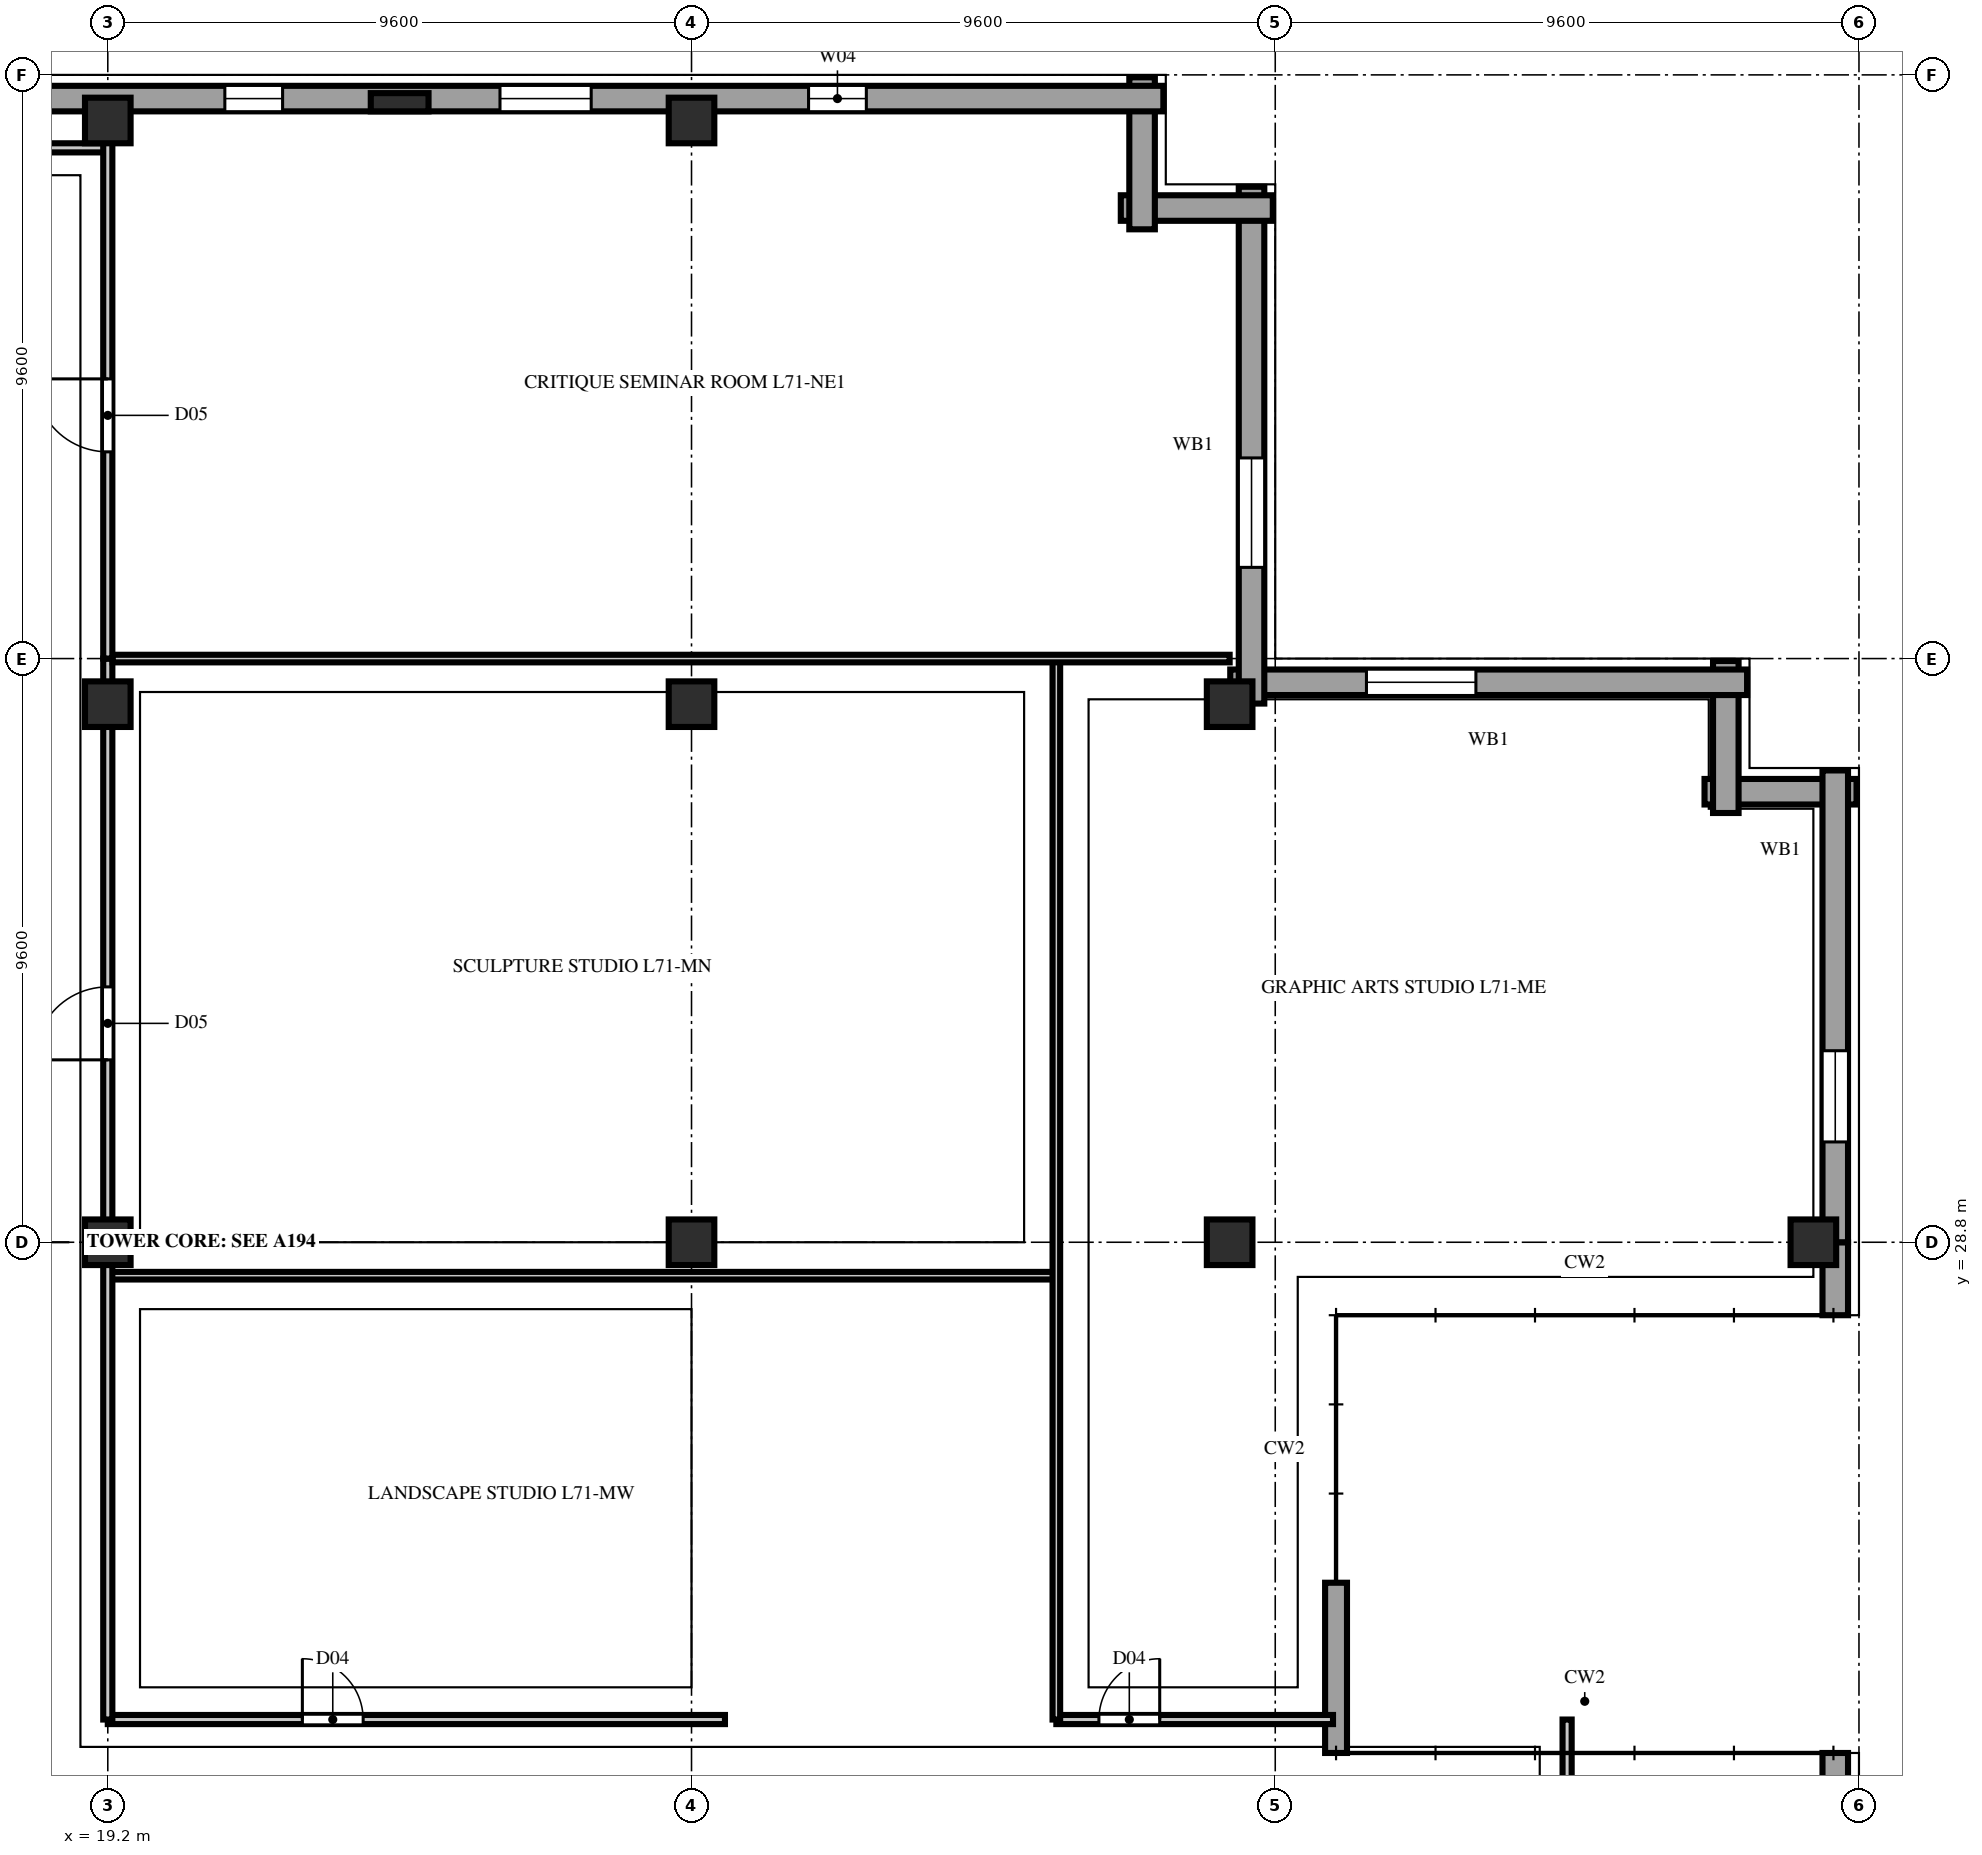
"""IFC4 building model, lengths in metres.
Left out: names, types, materials, properties, quantities, classifications, styles, units other than length and angle.
Written with IfcOpenShell. Run it as: python <this file> out.ifc"""

import sys

from ifc_helpers import new_model, si_unit, direction, frame, frame_2d, origin, origin_2d, place, context, subcontext, project, spatial, rectangle, extrude, element, fill, save


model = new_model("IFC4")
c1 = context("Model", 3, precision=1e-05, world=origin(), true_north=direction((0.0, 1.0)))
c2 = subcontext(c1, "Body", "Model", "MODEL_VIEW")
j1 = project(units=[si_unit("LENGTHUNIT", "METRE"), si_unit("PLANEANGLEUNIT", "RADIAN")], contexts=[c1])
p1 = place(None, origin())
s1 = spatial("IfcSite", under=j1, at=p1, CompositionType="ELEMENT")
p2 = place(p1, origin())
s2 = spatial("IfcBuilding", under=s1, at=p2, CompositionType="ELEMENT")
p3 = place(p2, frame((0.0, 0.0, 281.0)))
s3 = spatial("IfcBuildingStorey", under=s2, at=p3, CompositionType="ELEMENT", Elevation=281.0)
for number, where, z_axis, x_axis in (
    (1, (19.2, 28.8, 0.0), (0.0, 0.0, 1.0), (1.0, 0.0, 0.0)),
    (2, (19.2, 37.65, 0.0), (0.0, 0.0, 1.0), (1.0, 0.0, 0.0)),
    (3, (19.2, 47.25, 0.0), (0.0, 0.0, 1.0), (1.0, 0.0, 0.0)),
    (4, (28.8, 28.8, 0.0), (0.0, 0.0, 1.0), (1.0, 0.0, 0.0)),
    (5, (28.8, 37.65, 0.0), (0.0, 0.0, 1.0), (1.0, 0.0, 0.0)),
    (6, (28.8, 47.25, 0.0), (0.0, 0.0, 1.0), (1.0, 0.0, 0.0)),
    (7, (37.65, 28.8, 0.0), (0.0, 0.0, 1.0), (1.0, 0.0, 0.0)),
    (8, (37.65, 37.65, 0.0), (0.0, 0.0, 1.0), (1.0, 0.0, 0.0)),
    (9, (47.25, 28.8, 0.0), (0.0, 0.0, 1.0), (1.0, 0.0, 0.0)),
):
    element("IfcColumn", number, at=place(p3, frame(where, z_axis=z_axis, x_axis=x_axis)), inside=s3, PredefinedType="COLUMN", context=c2, shape_type="SweptSolid", body=[
        extrude(rectangle(XDim=0.75, YDim=0.75, at=origin_2d()), origin(), (0.0, 0.0, 1.0), 3.8),
    ])
p4 = place(p3, frame((24.0, 47.55, 0.0), z_axis=(0.0, 0.0, 1.0), x_axis=(1.0, 0.0, 0.0)))
e10 = element("IfcColumn", 10, at=p4, inside=s3, PredefinedType="PILASTER", context=c2, shape_type="SweptSolid", body=[
    extrude(rectangle(XDim=0.95, YDim=0.3, at=origin_2d()), origin(), (0.0, 0.0, 1.0), 3.8),
])
p5 = place(p3, frame((47.61, 27.6, 0.0), z_axis=(0.0, 0.0, 1.0), x_axis=(0.0, 1.0, 0.0)))
e11 = element("IfcWall", 11, at=p5, inside=s3, PredefinedType="SOLIDWALL", context=c2, shape_type="SweptSolid", body=[
    extrude(rectangle(XDim=1.2, YDim=0.42, at=frame_2d((0.6, 0.0))), origin(), (0.0, 0.0, 1.0), 2.14),
])
for number, where, z_axis, x_axis in (
    (12, (47.96, 36.21, 0.0), (0.0, 0.0, 1.0), (-1.0, 0.0, 0.0)),
    (13, (45.81, 35.86, 0.0), (0.0, 0.0, 1.0), (0.0, 1.0, 0.0)),
):
    element("IfcWall", number, at=place(p3, frame(where, z_axis=z_axis, x_axis=x_axis)), inside=s3, PredefinedType="SOLIDWALL", context=c2, shape_type="SweptSolid", body=[
        extrude(rectangle(XDim=2.5, YDim=0.42, at=frame_2d((1.25, 0.0))), origin(), (0.0, 0.0, 1.0), 3.54),
    ])
p6 = place(p3, frame((46.16, 38.01, 0.0), z_axis=(0.0, 0.0, 1.0), x_axis=(-1.0, 0.0, 0.0)))
e14 = element("IfcWall", 14, at=p6, inside=s3, PredefinedType="SOLIDWALL", context=c2, shape_type="SweptSolid", body=[
    extrude(rectangle(XDim=8.5, YDim=0.42, at=frame_2d((4.25, 0.0))), origin(), (0.0, 0.0, 1.0), 3.54),
])
p7 = place(p6, frame((4.46, 0.0, 0.85)))
e15 = element("IfcOpeningElement", 15, at=p7, cuts=e14, PredefinedType="OPENING", context=c2, shape_type="SweptSolid", body=[
    extrude(rectangle(XDim=1.8, YDim=1.85, at=frame_2d((0.9, 0.925))), frame((0.0, 0.222, 0.0), z_axis=(0.0, -1.0, 0.0), x_axis=(1.0, 0.0, 0.0)), (0.0, 0.0, 1.0), 0.444),
])
p8 = place(p3, frame((38.01, 37.66, 0.0), z_axis=(0.0, 0.0, 1.0), x_axis=(0.0, 1.0, 0.0)))
e16 = element("IfcWall", 16, at=p8, inside=s3, PredefinedType="SOLIDWALL", context=c2, shape_type="SweptSolid", body=[
    extrude(rectangle(XDim=8.5, YDim=0.42, at=frame_2d((4.25, 0.0))), origin(), (0.0, 0.0, 1.0), 3.54),
])
p9 = place(p8, frame((2.24, 0.0, 0.85)))
e17 = element("IfcOpeningElement", 17, at=p9, cuts=e16, PredefinedType="OPENING", context=c2, shape_type="SweptSolid", body=[
    extrude(rectangle(XDim=1.8, YDim=1.85, at=frame_2d((0.9, 0.925))), frame((0.0, 0.222, 0.0), z_axis=(0.0, -1.0, 0.0), x_axis=(1.0, 0.0, 0.0)), (0.0, 0.0, 1.0), 0.444),
])
for number, where, z_axis, x_axis in (
    (18, (38.36, 45.81, 0.0), (0.0, 0.0, 1.0), (-1.0, 0.0, 0.0)),
    (19, (36.21, 45.46, 0.0), (0.0, 0.0, 1.0), (0.0, 1.0, 0.0)),
):
    element("IfcWall", number, at=place(p3, frame(where, z_axis=z_axis, x_axis=x_axis)), inside=s3, PredefinedType="SOLIDWALL", context=c2, shape_type="SweptSolid", body=[
        extrude(rectangle(XDim=2.5, YDim=0.42, at=frame_2d((1.25, 0.0))), origin(), (0.0, 0.0, 1.0), 3.54),
    ])
p10 = place(p3, frame((36.56, 47.61, 0.0), z_axis=(0.0, 0.0, 1.0), x_axis=(-1.0, 0.0, 0.0)))
e20 = element("IfcWall", 20, at=p10, inside=s3, PredefinedType="SOLIDWALL", context=c2, shape_type="SweptSolid", body=[
    extrude(rectangle(XDim=34.085, YDim=0.42, at=frame_2d((17.042, 0.0))), origin(), (0.0, 0.0, 1.0), 3.54),
])
p11 = place(p10, frame((4.885, 0.0, 0.9)))
e21 = element("IfcOpeningElement", 21, at=p11, cuts=e20, PredefinedType="OPENING", context=c2, shape_type="SweptSolid", body=[
    extrude(rectangle(XDim=0.95, YDim=1.85, at=frame_2d((0.475, 0.925))), frame((0.0, 0.222, 0.0), z_axis=(0.0, -1.0, 0.0), x_axis=(1.0, 0.0, 0.0)), (0.0, 0.0, 1.0), 0.444),
])
p12 = place(p10, frame((9.41, 0.0, 0.9)))
e22 = element("IfcOpeningElement", 22, at=p12, cuts=e20, PredefinedType="OPENING", context=c2, shape_type="SweptSolid", body=[
    extrude(rectangle(XDim=1.5, YDim=1.85, at=frame_2d((0.75, 0.925))), frame((0.0, 0.222, 0.0), z_axis=(0.0, -1.0, 0.0), x_axis=(1.0, 0.0, 0.0)), (0.0, 0.0, 1.0), 0.444),
])
p13 = place(p10, frame((14.485, 0.0, 0.9)))
e23 = element("IfcOpeningElement", 23, at=p13, cuts=e20, PredefinedType="OPENING", context=c2, shape_type="SweptSolid", body=[
    extrude(rectangle(XDim=0.95, YDim=1.85, at=frame_2d((0.475, 0.925))), frame((0.0, 0.222, 0.0), z_axis=(0.0, -1.0, 0.0), x_axis=(1.0, 0.0, 0.0)), (0.0, 0.0, 1.0), 0.444),
])
p14 = place(p3, frame((39.4, 20.4, 0.0), z_axis=(0.0, 0.0, 1.0), x_axis=(0.0, 1.0, 0.0)))
e24 = element("IfcWall", 24, at=p14, inside=s3, PredefinedType="SOLIDWALL", context=c2, shape_type="SweptSolid", body=[
    extrude(rectangle(XDim=2.8, YDim=0.36, at=frame_2d((1.4, 0.0))), origin(), (0.0, 0.0, 1.0), 3.54),
])
p15 = place(p3, frame((17.05, 46.8, 0.0), z_axis=(0.0, 0.0, 1.0), x_axis=(1.0, 0.0, 0.0)))
e25 = element("IfcWall", 25, at=p15, inside=s3, PredefinedType="PARTITIONING", context=c2, shape_type="SweptSolid", body=[
    extrude(rectangle(XDim=2.15, YDim=0.15, at=frame_2d((1.075, 0.0))), origin(), (0.0, 0.0, 1.0), 3.54),
])
p16 = place(p3, frame((43.2, 18.1, 0.0), z_axis=(0.0, 0.0, 1.0), x_axis=(0.0, 1.0, 0.0)))
e26 = element("IfcWall", 26, at=p16, inside=s3, PredefinedType="PARTITIONING", context=c2, shape_type="SweptSolid", body=[
    extrude(rectangle(XDim=2.85, YDim=0.15, at=frame_2d((1.425, 0.0))), origin(), (0.0, 0.0, 1.0), 3.54),
])
p17 = place(p3, frame((19.2, 20.95, 0.0), z_axis=(0.0, 0.0, 1.0), x_axis=(1.0, 0.0, 0.0)))
e27 = element("IfcWall", 27, at=p17, inside=s3, PredefinedType="PARTITIONING", context=c2, shape_type="SweptSolid", body=[
    extrude(rectangle(XDim=10.15, YDim=0.15, at=frame_2d((5.075, 0.0))), origin(), (0.0, 0.0, 1.0), 3.54),
])
p18 = place(p17, frame((3.2, 0.0, 0.0)))
e28 = element("IfcOpeningElement", 28, at=p18, cuts=e27, PredefinedType="OPENING", context=c2, shape_type="SweptSolid", body=[
    extrude(rectangle(XDim=1.0, YDim=2.2, at=frame_2d((0.5, 1.1))), frame((0.0, 0.087, 0.0), z_axis=(0.0, -1.0, 0.0), x_axis=(1.0, 0.0, 0.0)), (0.0, 0.0, 1.0), 0.174),
])
p19 = place(p3, frame((34.8, 20.95, 0.0), z_axis=(0.0, 0.0, 1.0), x_axis=(1.0, 0.0, 0.0)))
e29 = element("IfcWall", 29, at=p19, inside=s3, PredefinedType="PARTITIONING", context=c2, shape_type="SweptSolid", body=[
    extrude(rectangle(XDim=4.55, YDim=0.15, at=frame_2d((2.275, 0.0))), origin(), (0.0, 0.0, 1.0), 3.54),
])
p20 = place(p19, frame((0.7, 0.0, 0.0)))
e30 = element("IfcOpeningElement", 30, at=p20, cuts=e29, PredefinedType="OPENING", context=c2, shape_type="SweptSolid", body=[
    extrude(rectangle(XDim=1.0, YDim=2.2, at=frame_2d((0.5, 1.1))), frame((0.0, 0.087, 0.0), z_axis=(0.0, -1.0, 0.0), x_axis=(1.0, 0.0, 0.0)), (0.0, 0.0, 1.0), 0.174),
])
p21 = place(p3, frame((19.2, 28.25, 0.0), z_axis=(0.0, 0.0, 1.0), x_axis=(1.0, 0.0, 0.0)))
e31 = element("IfcWall", 31, at=p21, inside=s3, PredefinedType="PARTITIONING", context=c2, shape_type="SweptSolid", body=[
    extrude(rectangle(XDim=15.6, YDim=0.125, at=frame_2d((7.8, 0.0))), origin(), (0.0, 0.0, 1.0), 3.54),
])
p22 = place(p3, frame((34.8, 20.95, 0.0), z_axis=(0.0, 0.0, 1.0), x_axis=(0.0, 1.0, 0.0)))
e32 = element("IfcWall", 32, at=p22, inside=s3, PredefinedType="PARTITIONING", context=c2, shape_type="SweptSolid", body=[
    extrude(rectangle(XDim=17.45, YDim=0.125, at=frame_2d((8.725, 0.0))), origin(), (0.0, 0.0, 1.0), 3.54),
])
p23 = place(p3, frame((19.2, 20.95, 0.0), z_axis=(0.0, 0.0, 1.0), x_axis=(0.0, 1.0, 0.0)))
e33 = element("IfcWall", 33, at=p23, inside=s3, PredefinedType="PARTITIONING", context=c2, shape_type="SweptSolid", body=[
    extrude(rectangle(XDim=17.45, YDim=0.15, at=frame_2d((8.725, 0.0))), origin(), (0.0, 0.0, 1.0), 2.923),
])
p24 = place(p23, frame((10.85, 0.0, 0.0)))
e34 = element("IfcOpeningElement", 34, at=p24, cuts=e33, PredefinedType="OPENING", context=c2, shape_type="SweptSolid", body=[
    extrude(rectangle(XDim=1.2, YDim=2.2, at=frame_2d((0.6, 1.1))), frame((0.0, 0.087, 0.0), z_axis=(0.0, -1.0, 0.0), x_axis=(1.0, 0.0, 0.0)), (0.0, 0.0, 1.0), 0.174),
])
p25 = place(p3, frame((19.28, 38.4, 0.0), z_axis=(0.0, 0.0, 1.0), x_axis=(1.0, 0.0, 0.0)))
e35 = element("IfcWall", 35, at=p25, inside=s3, PredefinedType="PARTITIONING", context=c2, shape_type="SweptSolid", body=[
    extrude(rectangle(XDim=18.37, YDim=0.125, at=frame_2d((9.185, 0.0))), origin(), (0.0, 0.0, 1.0), 3.54),
])
p26 = place(p3, frame((19.2, 38.4, 0.0), z_axis=(0.0, 0.0, 1.0), x_axis=(0.0, 1.0, 0.0)))
e36 = element("IfcWall", 36, at=p26, inside=s3, PredefinedType="PARTITIONING", context=c2, shape_type="SweptSolid", body=[
    extrude(rectangle(XDim=9.05, YDim=0.15, at=frame_2d((4.525, 0.0))), origin(), (0.0, 0.0, 1.0), 2.923),
])
p27 = place(p26, frame((3.4, 0.0, 0.0)))
e37 = element("IfcOpeningElement", 37, at=p27, cuts=e36, PredefinedType="OPENING", context=c2, shape_type="SweptSolid", body=[
    extrude(rectangle(XDim=1.2, YDim=2.2, at=frame_2d((0.6, 1.1))), frame((0.0, 0.087, 0.0), z_axis=(0.0, -1.0, 0.0), x_axis=(1.0, 0.0, 0.0)), (0.0, 0.0, 1.0), 0.174),
])
p28 = place(p3, frame((47.61, 19.2, 0.0), z_axis=(0.0, 0.0, 1.0), x_axis=(0.0, 1.0, 0.0)))
e38 = element("IfcWall", 38, at=p28, inside=s3, PredefinedType="SOLIDWALL", context=c2, shape_type="SweptSolid", body=[
    extrude(rectangle(XDim=1.2, YDim=0.42, at=frame_2d((0.6, 0.0))), origin(), (0.0, 0.0, 1.0), 2.14),
])
p29 = place(p3, frame((47.61, 28.8, 0.0), z_axis=(0.0, 0.0, 1.0), x_axis=(0.0, 1.0, 0.0)))
e39 = element("IfcWall", 39, at=p29, inside=s3, PredefinedType="SOLIDWALL", context=c2, shape_type="SweptSolid", body=[
    extrude(rectangle(XDim=7.76, YDim=0.42, at=frame_2d((3.88, 0.0))), origin(), (0.0, 0.0, 1.0), 3.54),
])
p30 = place(p29, frame((1.65, 0.0, 0.85)))
e40 = element("IfcOpeningElement", 40, at=p30, cuts=e39, PredefinedType="OPENING", context=c2, shape_type="SweptSolid", body=[
    extrude(rectangle(XDim=1.5, YDim=1.85, at=frame_2d((0.75, 0.925))), frame((0.0, 0.222, 0.0), z_axis=(0.0, -1.0, 0.0), x_axis=(1.0, 0.0, 0.0)), (0.0, 0.0, 1.0), 0.444),
])
p31 = place(p30, origin())
e41 = element("IfcWindow", 41, at=p31, inside=s3, PartitioningType="DOUBLE_PANEL_VERTICAL", PredefinedType="WINDOW", context=c2, shape_type="SweptSolid", body=[
    extrude(rectangle(XDim=1.5, YDim=1.85, at=frame_2d((0.75, 0.925))), frame((0.0, 0.11, 0.0), z_axis=(0.0, -1.0, 0.0), x_axis=(1.0, 0.0, 0.0)), (0.0, 0.0, 1.0), 0.06),
])
fill(e40, e41)
p32 = place(p7, origin())
e42 = element("IfcWindow", 42, at=p32, inside=s3, PartitioningType="DOUBLE_PANEL_VERTICAL", PredefinedType="WINDOW", context=c2, shape_type="SweptSolid", body=[
    extrude(rectangle(XDim=1.8, YDim=1.85, at=frame_2d((0.9, 0.925))), frame((0.0, 0.11, 0.0), z_axis=(0.0, -1.0, 0.0), x_axis=(1.0, 0.0, 0.0)), (0.0, 0.0, 1.0), 0.06),
])
fill(e15, e42)
p33 = place(p9, origin())
e43 = element("IfcWindow", 43, at=p33, inside=s3, PartitioningType="DOUBLE_PANEL_VERTICAL", PredefinedType="WINDOW", context=c2, shape_type="SweptSolid", body=[
    extrude(rectangle(XDim=1.8, YDim=1.85, at=frame_2d((0.9, 0.925))), frame((0.0, 0.11, 0.0), z_axis=(0.0, -1.0, 0.0), x_axis=(1.0, 0.0, 0.0)), (0.0, 0.0, 1.0), 0.06),
])
fill(e17, e43)
p34 = place(p11, origin())
e44 = element("IfcWindow", 44, at=p34, inside=s3, PartitioningType="SINGLE_PANEL", PredefinedType="WINDOW", context=c2, shape_type="SweptSolid", body=[
    extrude(rectangle(XDim=0.95, YDim=1.85, at=frame_2d((0.475, 0.925))), frame((0.0, 0.11, 0.0), z_axis=(0.0, -1.0, 0.0), x_axis=(1.0, 0.0, 0.0)), (0.0, 0.0, 1.0), 0.06),
])
fill(e21, e44)
p35 = place(p12, origin())
e45 = element("IfcWindow", 45, at=p35, inside=s3, PartitioningType="DOUBLE_PANEL_VERTICAL", PredefinedType="WINDOW", context=c2, shape_type="SweptSolid", body=[
    extrude(rectangle(XDim=1.5, YDim=1.85, at=frame_2d((0.75, 0.925))), frame((0.0, 0.11, 0.0), z_axis=(0.0, -1.0, 0.0), x_axis=(1.0, 0.0, 0.0)), (0.0, 0.0, 1.0), 0.06),
])
fill(e22, e45)
p36 = place(p13, origin())
e46 = element("IfcWindow", 46, at=p36, inside=s3, PartitioningType="SINGLE_PANEL", PredefinedType="WINDOW", context=c2, shape_type="SweptSolid", body=[
    extrude(rectangle(XDim=0.95, YDim=1.85, at=frame_2d((0.475, 0.925))), frame((0.0, 0.11, 0.0), z_axis=(0.0, -1.0, 0.0), x_axis=(1.0, 0.0, 0.0)), (0.0, 0.0, 1.0), 0.06),
])
fill(e23, e46)
p37 = place(p18, origin())
e47 = element("IfcDoor", 47, at=p37, inside=s3, OperationType="SINGLE_SWING_LEFT", PredefinedType="DOOR", context=c2, shape_type="SweptSolid", body=[
    extrude(rectangle(XDim=1.0, YDim=2.2, at=frame_2d((0.5, 1.1))), frame((0.0, 0.025, 0.0), z_axis=(0.0, -1.0, 0.0), x_axis=(1.0, 0.0, 0.0)), (0.0, 0.0, 1.0), 0.05),
])
fill(e28, e47)
p38 = place(p20, origin())
e48 = element("IfcDoor", 48, at=p38, inside=s3, OperationType="SINGLE_SWING_RIGHT", PredefinedType="DOOR", context=c2, shape_type="SweptSolid", body=[
    extrude(rectangle(XDim=1.0, YDim=2.2, at=frame_2d((0.5, 1.1))), frame((0.0, 0.025, 0.0), z_axis=(0.0, -1.0, 0.0), x_axis=(1.0, 0.0, 0.0)), (0.0, 0.0, 1.0), 0.05),
])
fill(e30, e48)
p39 = place(p24, origin())
e49 = element("IfcDoor", 49, at=p39, inside=s3, OperationType="SINGLE_SWING_LEFT", PredefinedType="DOOR", context=c2, shape_type="SweptSolid", body=[
    extrude(rectangle(XDim=1.2, YDim=2.2, at=frame_2d((0.6, 1.1))), frame((0.0, 0.025, 0.0), z_axis=(0.0, -1.0, 0.0), x_axis=(1.0, 0.0, 0.0)), (0.0, 0.0, 1.0), 0.05),
])
fill(e34, e49)
p40 = place(p27, origin())
e50 = element("IfcDoor", 50, at=p40, inside=s3, OperationType="SINGLE_SWING_RIGHT", PredefinedType="DOOR", context=c2, shape_type="SweptSolid", body=[
    extrude(rectangle(XDim=1.2, YDim=2.2, at=frame_2d((0.6, 1.1))), frame((0.0, 0.025, 0.0), z_axis=(0.0, -1.0, 0.0), x_axis=(1.0, 0.0, 0.0)), (0.0, 0.0, 1.0), 0.05),
])
fill(e37, e50)
save(model, sys.argv[1])
